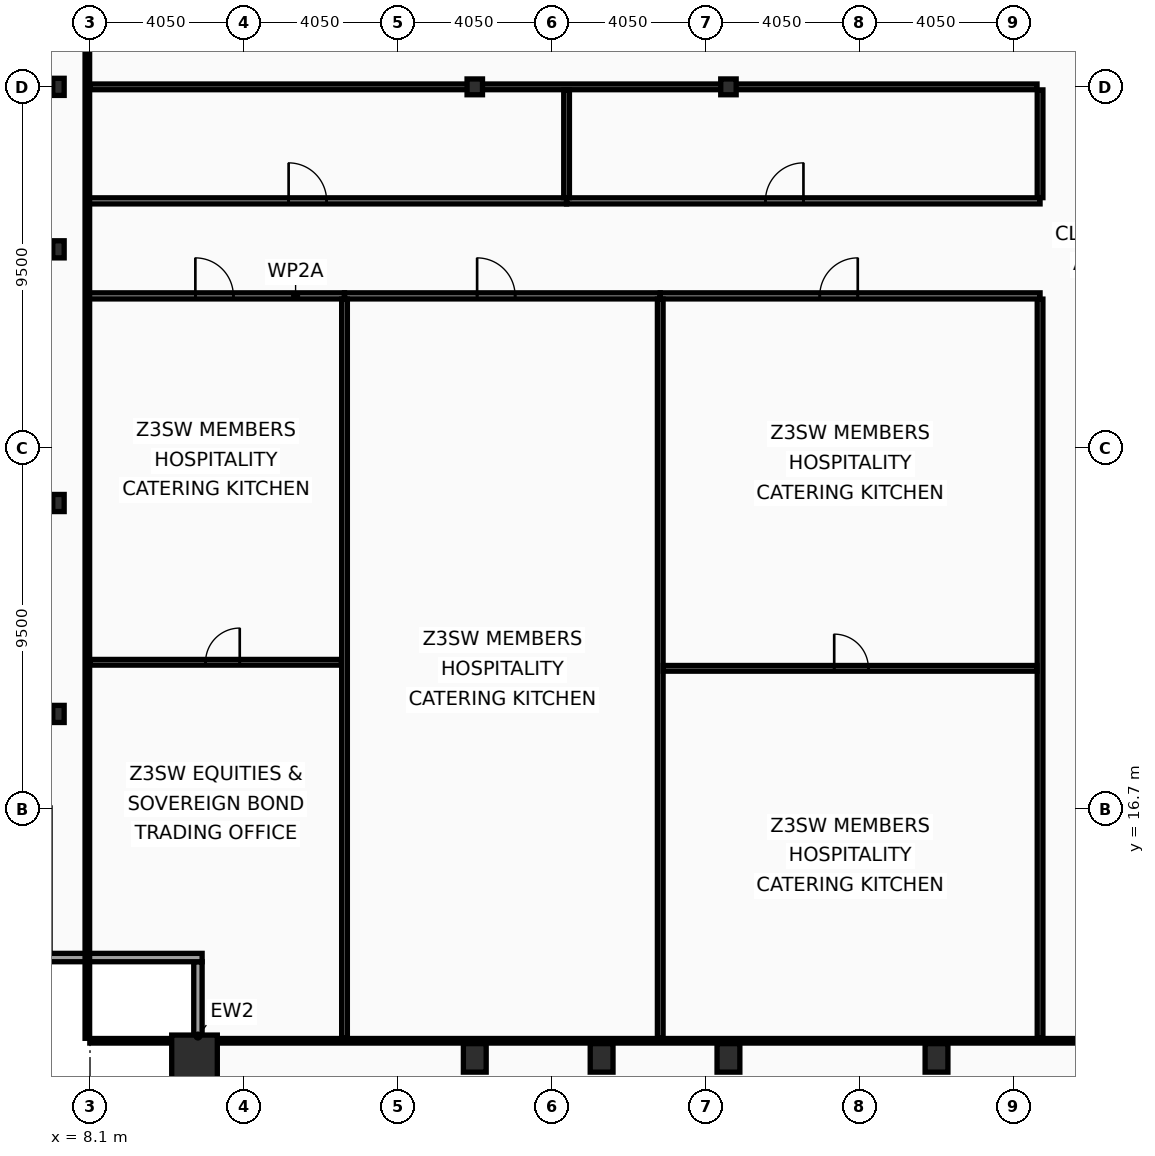
"""IFC4 building model, lengths in metres.
Left out: names, types, materials, properties, quantities, classifications, styles, units other than length and angle.
Written with IfcOpenShell. Run it as: python <this file> out.ifc"""

import sys

from ifc_helpers import new_model, si_unit, direction, frame, frame_2d, origin, origin_2d, place, context, subcontext, project, spatial, rectangle, hollow_rectangle, i_section, extrude, element, fill, save


model = new_model("IFC4")
c1 = context("Model", 3, precision=1e-05, world=origin(), true_north=direction((0.0, 1.0)))
c2 = subcontext(c1, "Body", "Model", "MODEL_VIEW")
j1 = project(units=[si_unit("LENGTHUNIT", "METRE"), si_unit("PLANEANGLEUNIT", "RADIAN")], contexts=[c1])
p1 = place(None, origin())
s1 = spatial("IfcSite", under=j1, at=p1, CompositionType="ELEMENT")
p2 = place(p1, origin())
s2 = spatial("IfcBuilding", under=s1, at=p2, CompositionType="ELEMENT")
p3 = place(p2, frame((0.0, 0.0, 224.6)))
s3 = spatial("IfcBuildingStorey", under=s2, at=p3, CompositionType="ELEMENT", Elevation=224.6)
p4 = place(p3, frame((10.85, 10.15, 0.0), z_axis=(0.0, 0.0, 1.0), x_axis=(1.0, 0.0, 0.0)))
e1 = element("IfcColumn", 1, at=p4, inside=s3, PredefinedType="COLUMN", context=c2, shape_type="SweptSolid", body=[
    extrude(hollow_rectangle(XDim=1.2, YDim=1.2, WallThickness=0.06, at=origin_2d()), origin(), (0.0, 0.0, 1.0), 3.6),
])
for number, where, z_axis, x_axis in (
    (2, (18.225, 10.15, 0.0), (0.0, 0.0, 1.0), (1.0, 0.0, 0.0)),
    (3, (21.562, 10.15, 0.0), (0.0, 0.0, 1.0), (1.0, 0.0, 0.0)),
    (4, (24.9, 10.15, 0.0), (0.0, 0.0, 1.0), (1.0, 0.0, 0.0)),
    (5, (30.375, 10.15, 0.0), (0.0, 0.0, 1.0), (1.0, 0.0, 0.0)),
):
    element("IfcColumn", number, at=place(p3, frame(where, z_axis=z_axis, x_axis=x_axis)), inside=s3, PredefinedType="COLUMN", context=c2, shape_type="SweptSolid", body=[
        extrude(hollow_rectangle(XDim=0.6, YDim=0.75, WallThickness=0.045, at=origin_2d()), origin(), (0.0, 0.0, 1.0), 3.6),
    ])
for number, where, z_axis, x_axis in (
    (6, (7.27, 19.2, 0.0), (0.0, 0.0, 1.0), (1.0, 0.0, 0.0)),
    (7, (7.27, 24.75, 0.0), (0.0, 0.0, 1.0), (1.0, 0.0, 0.0)),
    (8, (7.27, 31.425, 0.0), (0.0, 0.0, 1.0), (1.0, 0.0, 0.0)),
    (9, (7.27, 35.7, 0.0), (0.0, 0.0, 1.0), (1.0, 0.0, 0.0)),
):
    element("IfcColumn", number, at=place(p3, frame(where, z_axis=z_axis, x_axis=x_axis)), inside=s3, PredefinedType="COLUMN", context=c2, shape_type="SweptSolid", body=[
        extrude(i_section(OverallWidth=0.3, OverallDepth=0.45, WebThickness=0.014, FlangeThickness=0.026, at=origin_2d()), origin(), (0.0, 0.0, 1.0), 3.6),
    ])
for number, where, z_axis, x_axis in (
    (10, (18.225, 35.7, 0.0), (0.0, 0.0, 1.0), (1.0, 0.0, 0.0)),
    (11, (24.9, 35.7, 0.0), (0.0, 0.0, 1.0), (1.0, 0.0, 0.0)),
):
    element("IfcColumn", number, at=place(p3, frame(where, z_axis=z_axis, x_axis=x_axis)), inside=s3, PredefinedType="COLUMN", context=c2, shape_type="SweptSolid", body=[
        extrude(i_section(OverallWidth=0.406, OverallDepth=0.416, WebThickness=0.03, FlangeThickness=0.048, at=origin_2d()), origin(), (0.0, 0.0, 1.0), 3.6),
    ])
p5 = place(p3, frame((10.94, 8.77, 0.0), z_axis=(0.0, 0.0, 1.0), x_axis=(0.0, 1.0, 0.0)))
e12 = element("IfcWall", 12, at=p5, inside=s3, PredefinedType="SOLIDWALL", context=c2, shape_type="SweptSolid", body=[
    extrude(rectangle(XDim=3.91, YDim=0.22, at=frame_2d((1.955, 0.0))), origin(), (0.0, 0.0, 1.0), 2.83),
])
p6 = place(p3, frame((11.05, 12.79, 0.0), z_axis=(0.0, 0.0, 1.0), x_axis=(-1.0, 0.0, 0.0)))
e13 = element("IfcWall", 13, at=p6, inside=s3, PredefinedType="SOLIDWALL", context=c2, shape_type="SweptSolid", body=[
    extrude(rectangle(XDim=4.22, YDim=0.22, at=frame_2d((2.11, 0.0))), origin(), (0.0, 0.0, 1.0), 2.83),
])
p7 = place(p3, frame((33.1, 10.665, 0.0), z_axis=(0.0, 0.0, 1.0), x_axis=(0.0, 1.0, 0.0)))
e14 = element("IfcWall", 14, at=p7, inside=s3, PredefinedType="PARTITIONING", context=c2, shape_type="SweptSolid", body=[
    extrude(rectangle(XDim=19.45, YDim=0.15, at=frame_2d((9.725, 0.0))), origin(), (0.0, 0.0, 1.0), 2.98),
])
p8 = place(p3, frame((33.1, 32.785, 0.0), z_axis=(0.0, 0.0, 1.0), x_axis=(0.0, 1.0, 0.0)))
e15 = element("IfcWall", 15, at=p8, inside=s3, PredefinedType="PARTITIONING", context=c2, shape_type="SweptSolid", body=[
    extrude(rectangle(XDim=2.835, YDim=0.15, at=frame_2d((1.417, 0.0))), origin(), (0.0, 0.0, 1.0), 2.98),
])
p9 = place(p3, frame((8.095, 35.7, 0.0), z_axis=(0.0, 0.0, 1.0), x_axis=(1.0, 0.0, 0.0)))
e16 = element("IfcWall", 16, at=p9, inside=s3, PredefinedType="PARTITIONING", context=c2, shape_type="SweptSolid", body=[
    extrude(rectangle(XDim=24.925, YDim=0.15, at=frame_2d((12.462, 0.0))), origin(), (0.0, 0.0, 1.0), 2.78),
])
p10 = place(p3, frame((8.03, 30.2, 0.0), z_axis=(0.0, 0.0, 1.0), x_axis=(1.0, 0.0, 0.0)))
e17 = element("IfcWall", 17, at=p10, inside=s3, PredefinedType="PARTITIONING", context=c2, shape_type="SweptSolid", body=[
    extrude(rectangle(XDim=6.767, YDim=0.16, at=frame_2d((3.384, 0.0))), origin(), (0.0, 0.0, 1.0), 3.44),
])
p11 = place(p10, frame((2.842, 0.0, 0.0)))
e18 = element("IfcOpeningElement", 18, at=p11, cuts=e17, PredefinedType="OPENING", context=c2, shape_type="SweptSolid", body=[
    extrude(rectangle(XDim=1.0, YDim=2.05, at=frame_2d((0.5, 1.025))), frame((0.0, 0.09, 0.0), z_axis=(0.0, -1.0, 0.0), x_axis=(1.0, 0.0, 0.0)), (0.0, 0.0, 1.0), 0.18),
])
p12 = place(p3, frame((8.095, 20.559, 0.0), z_axis=(0.0, 0.0, 1.0), x_axis=(1.0, 0.0, 0.0)))
e19 = element("IfcWall", 19, at=p12, inside=s3, PredefinedType="PARTITIONING", context=c2, shape_type="SweptSolid", body=[
    extrude(rectangle(XDim=6.622, YDim=0.15, at=frame_2d((3.311, 0.0))), origin(), (0.0, 0.0, 1.0), 3.44),
])
p13 = place(p12, frame((3.045, 0.0, 0.0)))
e20 = element("IfcOpeningElement", 20, at=p13, cuts=e19, PredefinedType="OPENING", context=c2, shape_type="SweptSolid", body=[
    extrude(rectangle(XDim=0.9, YDim=2.05, at=frame_2d((0.45, 1.025))), frame((0.0, 0.085, 0.0), z_axis=(0.0, -1.0, 0.0), x_axis=(1.0, 0.0, 0.0)), (0.0, 0.0, 1.0), 0.17),
])
p14 = place(p3, frame((14.797, 30.2, 0.0), z_axis=(0.0, 0.0, 1.0), x_axis=(1.0, 0.0, 0.0)))
e21 = element("IfcWall", 21, at=p14, inside=s3, PredefinedType="PARTITIONING", context=c2, shape_type="SweptSolid", body=[
    extrude(rectangle(XDim=8.308, YDim=0.16, at=frame_2d((4.154, 0.0))), origin(), (0.0, 0.0, 1.0), 2.78),
])
p15 = place(p14, frame((3.49, 0.0, 0.0)))
e22 = element("IfcOpeningElement", 22, at=p15, cuts=e21, PredefinedType="OPENING", context=c2, shape_type="SweptSolid", body=[
    extrude(rectangle(XDim=1.0, YDim=2.05, at=frame_2d((0.5, 1.025))), frame((0.0, 0.09, 0.0), z_axis=(0.0, -1.0, 0.0), x_axis=(1.0, 0.0, 0.0)), (0.0, 0.0, 1.0), 0.18),
])
p16 = place(p3, frame((14.797, 10.665, 0.0), z_axis=(0.0, 0.0, 1.0), x_axis=(0.0, 1.0, 0.0)))
e23 = element("IfcWall", 23, at=p16, inside=s3, PredefinedType="PARTITIONING", context=c2, shape_type="SweptSolid", body=[
    extrude(rectangle(XDim=19.45, YDim=0.15, at=frame_2d((9.725, 0.0))), origin(), (0.0, 0.0, 1.0), 2.78),
])
p17 = place(p3, frame((23.105, 30.2, 0.0), z_axis=(0.0, 0.0, 1.0), x_axis=(1.0, 0.0, 0.0)))
e24 = element("IfcWall", 24, at=p17, inside=s3, PredefinedType="PARTITIONING", context=c2, shape_type="SweptSolid", body=[
    extrude(rectangle(XDim=9.995, YDim=0.16, at=frame_2d((4.998, 0.0))), origin(), (0.0, 0.0, 1.0), 2.78),
])
p18 = place(p17, frame((4.198, 0.0, 0.0)))
e25 = element("IfcOpeningElement", 25, at=p18, cuts=e24, PredefinedType="OPENING", context=c2, shape_type="SweptSolid", body=[
    extrude(rectangle(XDim=1.0, YDim=2.05, at=frame_2d((0.5, 1.025))), frame((0.0, 0.09, 0.0), z_axis=(0.0, -1.0, 0.0), x_axis=(1.0, 0.0, 0.0)), (0.0, 0.0, 1.0), 0.18),
])
p19 = place(p3, frame((23.105, 10.665, 0.0), z_axis=(0.0, 0.0, 1.0), x_axis=(0.0, 1.0, 0.0)))
e26 = element("IfcWall", 26, at=p19, inside=s3, PredefinedType="PARTITIONING", context=c2, shape_type="SweptSolid", body=[
    extrude(rectangle(XDim=19.45, YDim=0.15, at=frame_2d((9.725, 0.0))), origin(), (0.0, 0.0, 1.0), 2.98),
])
p20 = place(p3, frame((23.185, 20.4, 0.0), z_axis=(0.0, 0.0, 1.0), x_axis=(1.0, 0.0, 0.0)))
e27 = element("IfcWall", 27, at=p20, inside=s3, PredefinedType="PARTITIONING", context=c2, shape_type="SweptSolid", body=[
    extrude(rectangle(XDim=9.835, YDim=0.15, at=frame_2d((4.917, 0.0))), origin(), (0.0, 0.0, 1.0), 2.78),
])
p21 = place(p20, frame((4.498, 0.0, 0.0)))
e28 = element("IfcOpeningElement", 28, at=p21, cuts=e27, PredefinedType="OPENING", context=c2, shape_type="SweptSolid", body=[
    extrude(rectangle(XDim=0.9, YDim=2.05, at=frame_2d((0.45, 1.025))), frame((0.0, 0.085, 0.0), z_axis=(0.0, -1.0, 0.0), x_axis=(1.0, 0.0, 0.0)), (0.0, 0.0, 1.0), 0.17),
])
p22 = place(p3, frame((8.03, 32.7, 0.0), z_axis=(0.0, 0.0, 1.0), x_axis=(1.0, 0.0, 0.0)))
e29 = element("IfcWall", 29, at=p22, inside=s3, PredefinedType="PARTITIONING", context=c2, shape_type="SweptSolid", body=[
    extrude(rectangle(XDim=12.611, YDim=0.16, at=frame_2d((6.305, 0.0))), origin(), (0.0, 0.0, 1.0), 2.78),
])
p23 = place(p22, frame((5.296, 0.0, 0.0)))
e30 = element("IfcOpeningElement", 30, at=p23, cuts=e29, PredefinedType="OPENING", context=c2, shape_type="SweptSolid", body=[
    extrude(rectangle(XDim=1.0, YDim=2.05, at=frame_2d((0.5, 1.025))), frame((0.0, 0.09, 0.0), z_axis=(0.0, -1.0, 0.0), x_axis=(1.0, 0.0, 0.0)), (0.0, 0.0, 1.0), 0.18),
])
p24 = place(p3, frame((20.641, 32.7, 0.0), z_axis=(0.0, 0.0, 1.0), x_axis=(1.0, 0.0, 0.0)))
e31 = element("IfcWall", 31, at=p24, inside=s3, PredefinedType="PARTITIONING", context=c2, shape_type="SweptSolid", body=[
    extrude(rectangle(XDim=12.459, YDim=0.16, at=frame_2d((6.23, 0.0))), origin(), (0.0, 0.0, 1.0), 2.78),
])
p25 = place(p24, frame((5.233, 0.0, 0.0)))
e32 = element("IfcOpeningElement", 32, at=p25, cuts=e31, PredefinedType="OPENING", context=c2, shape_type="SweptSolid", body=[
    extrude(rectangle(XDim=1.0, YDim=2.05, at=frame_2d((0.5, 1.025))), frame((0.0, 0.09, 0.0), z_axis=(0.0, -1.0, 0.0), x_axis=(1.0, 0.0, 0.0)), (0.0, 0.0, 1.0), 0.18),
])
p26 = place(p3, frame((20.641, 32.785, 0.0), z_axis=(0.0, 0.0, 1.0), x_axis=(0.0, 1.0, 0.0)))
e33 = element("IfcWall", 33, at=p26, inside=s3, PredefinedType="PARTITIONING", context=c2, shape_type="SweptSolid", body=[
    extrude(rectangle(XDim=2.835, YDim=0.15, at=frame_2d((1.417, 0.0))), origin(), (0.0, 0.0, 1.0), 2.98),
])
p27 = place(p3, frame((8.03, 10.665, 0.0), z_axis=(0.0, 0.0, 1.0), x_axis=(0.0, 1.0, 0.0)))
e34 = element("IfcWall", 34, at=p27, inside=s3, PredefinedType="PARTITIONING", context=c2, shape_type="SweptSolid", body=[
    extrude(rectangle(XDim=42.11, YDim=0.12, at=frame_2d((21.055, 0.0))), origin(), (0.0, 0.0, 1.0), 2.78),
])
p28 = place(p3, frame((8.095, 10.6, 0.0), z_axis=(0.0, 0.0, 1.0), x_axis=(1.0, 0.0, 0.0)))
e35 = element("IfcWall", 35, at=p28, inside=s3, PredefinedType="PARTITIONING", context=c2, shape_type="SweptSolid", body=[
    extrude(rectangle(XDim=56.71, YDim=0.12, at=frame_2d((28.355, 0.0))), origin(), (0.0, 0.0, 1.0), 2.78),
])
p29 = place(p11, origin())
e36 = element("IfcDoor", 36, at=p29, inside=s3, OperationType="SINGLE_SWING_LEFT", PredefinedType="DOOR", context=c2, shape_type="SweptSolid", body=[
    extrude(rectangle(XDim=1.0, YDim=2.05, at=frame_2d((0.5, 1.025))), frame((0.0, 0.025, 0.0), z_axis=(0.0, -1.0, 0.0), x_axis=(1.0, 0.0, 0.0)), (0.0, 0.0, 1.0), 0.05),
])
fill(e18, e36)
p30 = place(p13, origin())
e37 = element("IfcDoor", 37, at=p30, inside=s3, OperationType="SINGLE_SWING_RIGHT", PredefinedType="DOOR", context=c2, shape_type="SweptSolid", body=[
    extrude(rectangle(XDim=0.9, YDim=2.05, at=frame_2d((0.45, 1.025))), frame((0.0, 0.025, 0.0), z_axis=(0.0, -1.0, 0.0), x_axis=(1.0, 0.0, 0.0)), (0.0, 0.0, 1.0), 0.05),
])
fill(e20, e37)
p31 = place(p15, origin())
e38 = element("IfcDoor", 38, at=p31, inside=s3, OperationType="SINGLE_SWING_LEFT", PredefinedType="DOOR", context=c2, shape_type="SweptSolid", body=[
    extrude(rectangle(XDim=1.0, YDim=2.05, at=frame_2d((0.5, 1.025))), frame((0.0, 0.025, 0.0), z_axis=(0.0, -1.0, 0.0), x_axis=(1.0, 0.0, 0.0)), (0.0, 0.0, 1.0), 0.05),
])
fill(e22, e38)
p32 = place(p18, origin())
e39 = element("IfcDoor", 39, at=p32, inside=s3, OperationType="SINGLE_SWING_RIGHT", PredefinedType="DOOR", context=c2, shape_type="SweptSolid", body=[
    extrude(rectangle(XDim=1.0, YDim=2.05, at=frame_2d((0.5, 1.025))), frame((0.0, 0.025, 0.0), z_axis=(0.0, -1.0, 0.0), x_axis=(1.0, 0.0, 0.0)), (0.0, 0.0, 1.0), 0.05),
])
fill(e25, e39)
p33 = place(p21, origin())
e40 = element("IfcDoor", 40, at=p33, inside=s3, OperationType="SINGLE_SWING_LEFT", PredefinedType="DOOR", context=c2, shape_type="SweptSolid", body=[
    extrude(rectangle(XDim=0.9, YDim=2.05, at=frame_2d((0.45, 1.025))), frame((0.0, 0.025, 0.0), z_axis=(0.0, -1.0, 0.0), x_axis=(1.0, 0.0, 0.0)), (0.0, 0.0, 1.0), 0.05),
])
fill(e28, e40)
p34 = place(p23, origin())
e41 = element("IfcDoor", 41, at=p34, inside=s3, OperationType="SINGLE_SWING_LEFT", PredefinedType="DOOR", context=c2, shape_type="SweptSolid", body=[
    extrude(rectangle(XDim=1.0, YDim=2.05, at=frame_2d((0.5, 1.025))), frame((0.0, 0.025, 0.0), z_axis=(0.0, -1.0, 0.0), x_axis=(1.0, 0.0, 0.0)), (0.0, 0.0, 1.0), 0.05),
])
fill(e30, e41)
p35 = place(p25, origin())
e42 = element("IfcDoor", 42, at=p35, inside=s3, OperationType="SINGLE_SWING_RIGHT", PredefinedType="DOOR", context=c2, shape_type="SweptSolid", body=[
    extrude(rectangle(XDim=1.0, YDim=2.05, at=frame_2d((0.5, 1.025))), frame((0.0, 0.025, 0.0), z_axis=(0.0, -1.0, 0.0), x_axis=(1.0, 0.0, 0.0)), (0.0, 0.0, 1.0), 0.05),
])
fill(e32, e42)
save(model, sys.argv[1])
